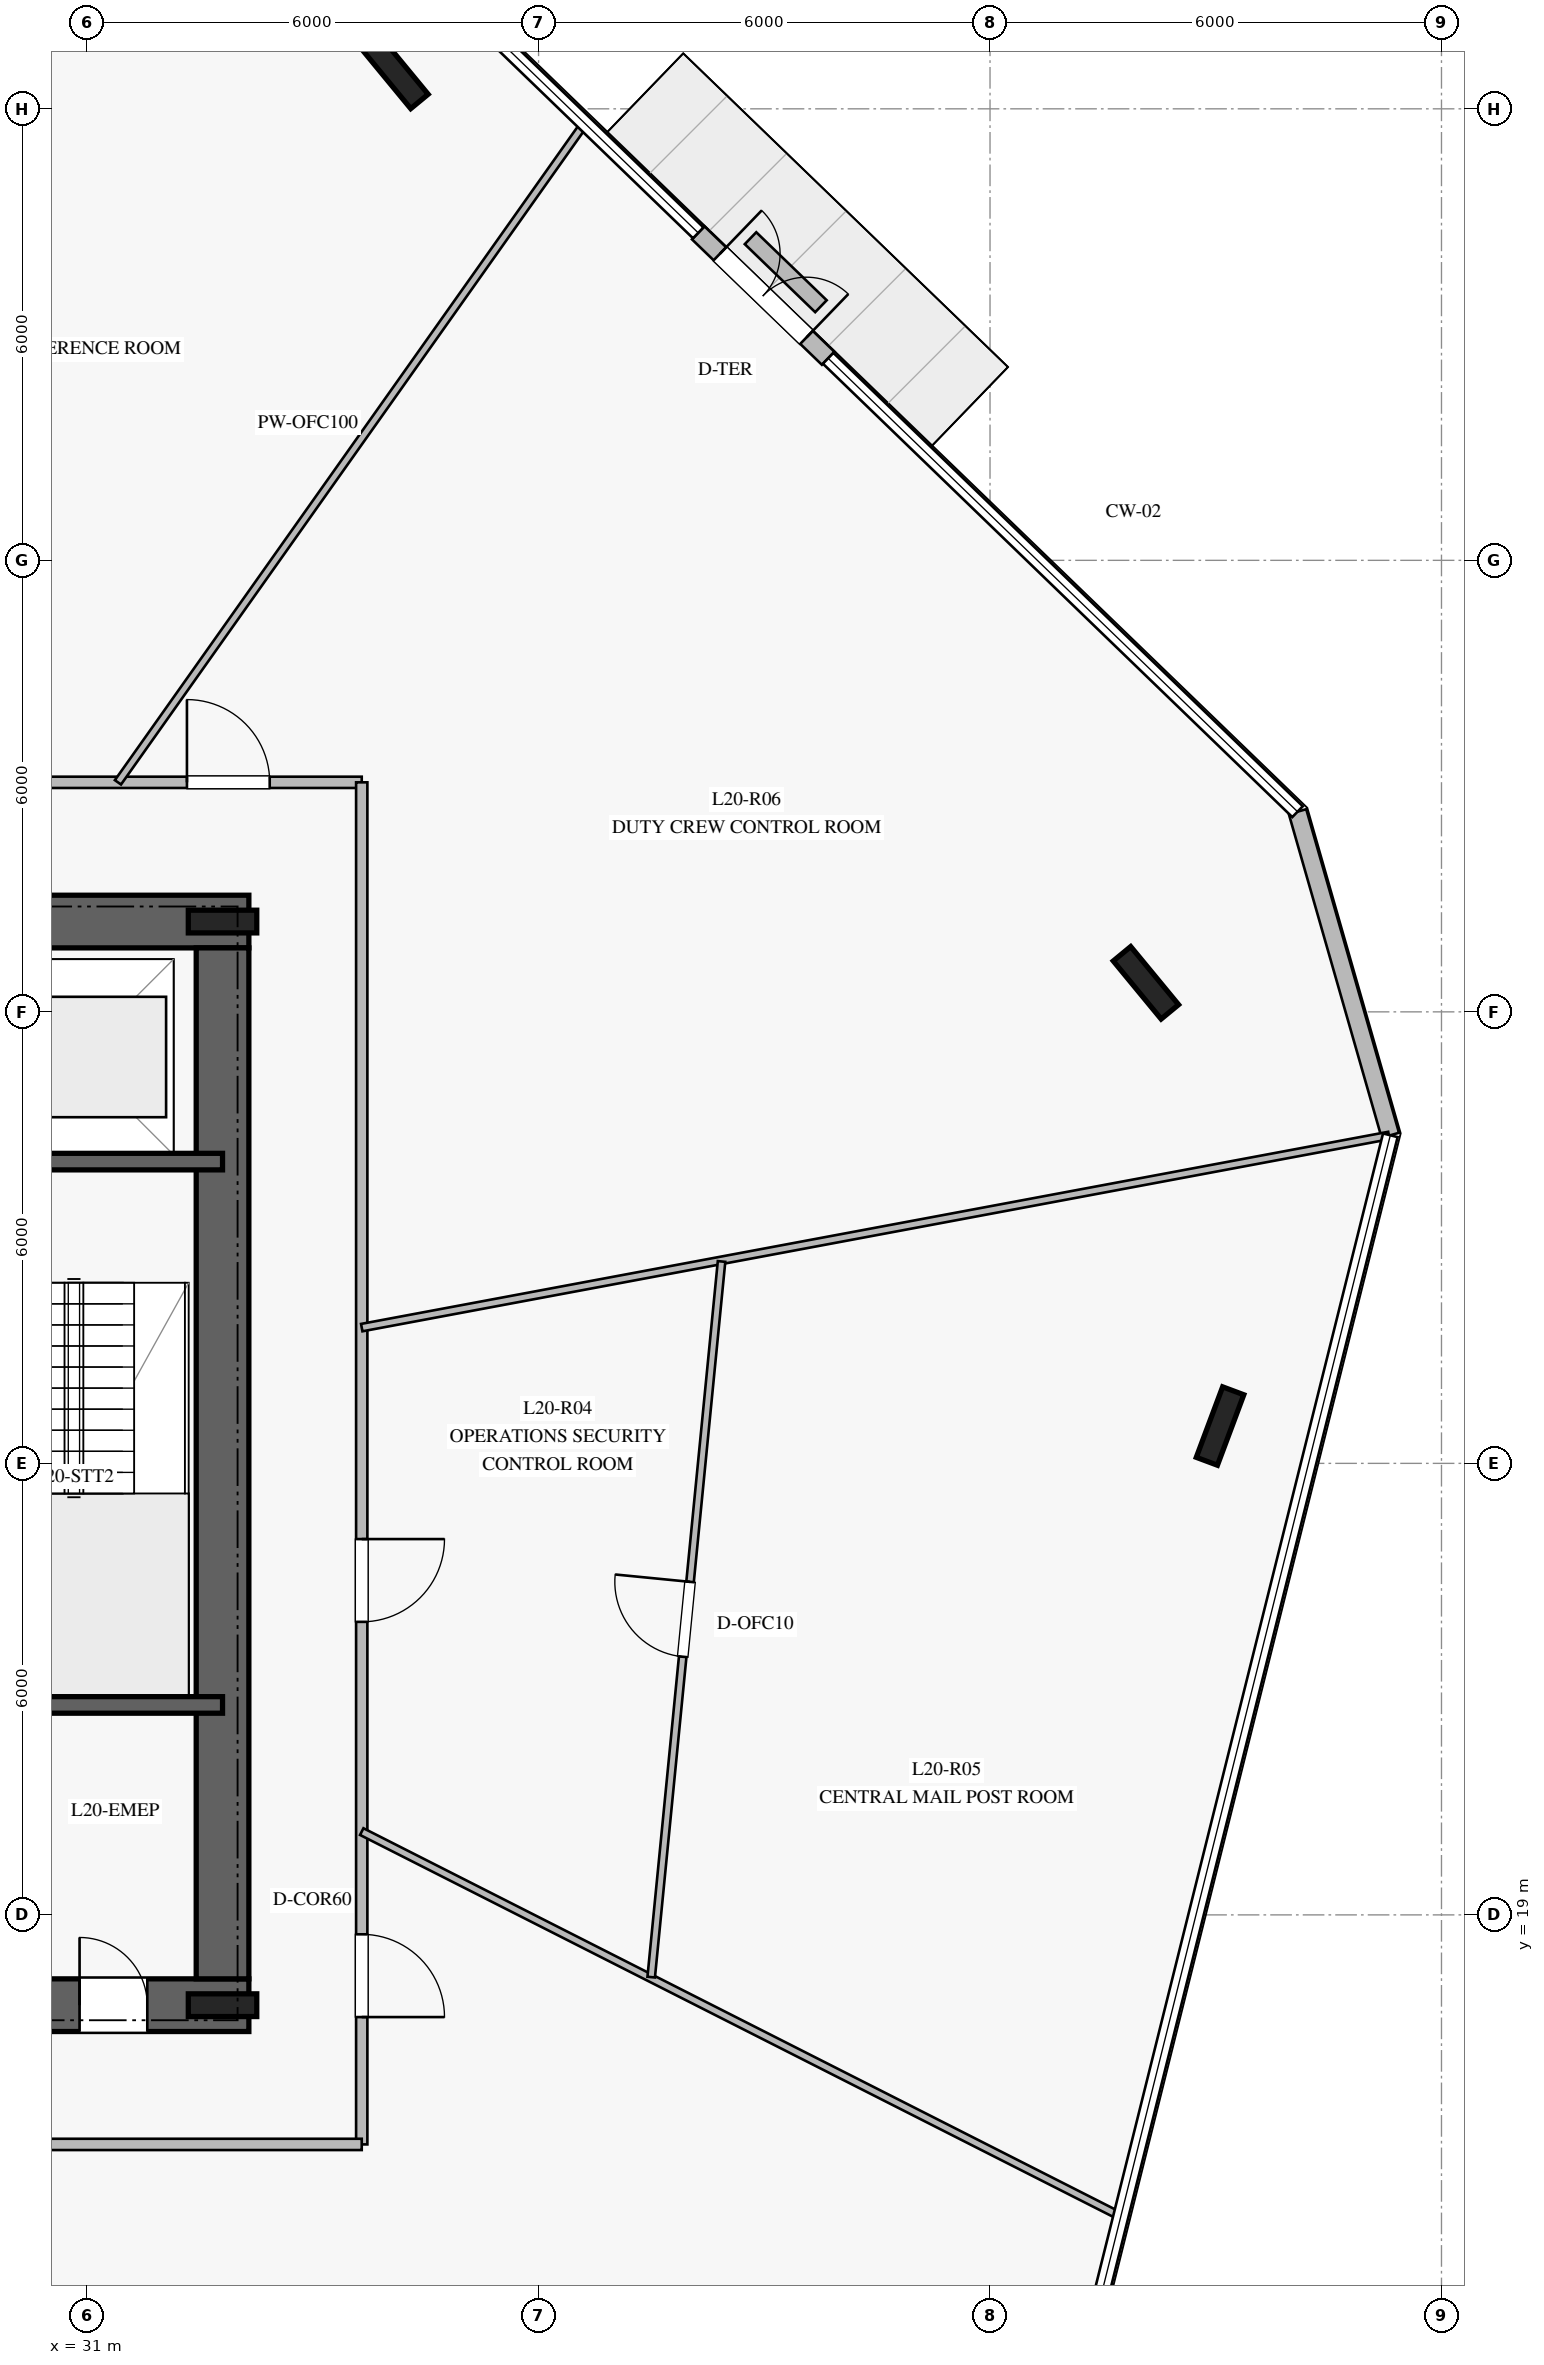
"""IFC4 building model, lengths in metres.
Left out: names, types, materials, properties, quantities, classifications, styles, units other than length and angle.
Written with IfcOpenShell. Run it as: python <this file> out.ifc"""

import sys

from ifc_helpers import new_model, si_unit, direction, frame, frame_2d, origin, origin_2d, place, context, subcontext, project, spatial, rectangle, i_section, extrude, element, fill, save


model = new_model("IFC4")
c1 = context("Model", 3, precision=1e-05, world=origin(), true_north=direction((0.0, 1.0)))
c2 = subcontext(c1, "Body", "Model", "MODEL_VIEW")
j1 = project(units=[si_unit("LENGTHUNIT", "METRE"), si_unit("PLANEANGLEUNIT", "RADIAN")], contexts=[c1])
p1 = place(None, origin())
s1 = spatial("IfcSite", under=j1, at=p1, CompositionType="ELEMENT")
p2 = place(p1, origin())
s2 = spatial("IfcBuilding", under=s1, at=p2, CompositionType="ELEMENT")
p3 = place(p2, frame((0.0, 0.0, 84.0)))
s3 = spatial("IfcBuildingStorey", under=s2, at=p3, CompositionType="ELEMENT", Elevation=84.0)
p4 = place(p3, frame((16.85, 17.8, 0.0), z_axis=(0.0, 0.0, 1.0), x_axis=(1.0, 0.0, 0.0)))
e1 = element("IfcWall", 1, at=p4, inside=s3, PredefinedType="SHEAR", context=c2, shape_type="SweptSolid", body=[
    extrude(rectangle(XDim=16.3, YDim=0.7, at=frame_2d((8.15, 0.0))), origin(), (0.0, 0.0, 1.0), 3.76),
])
p5 = place(p4, frame((5.1, 0.0, 0.0)))
e2 = element("IfcOpeningElement", 2, at=p5, cuts=e1, PredefinedType="OPENING", context=c2, shape_type="SweptSolid", body=[
    extrude(rectangle(XDim=1.2, YDim=2.25, at=frame_2d((0.6, 1.125))), frame((0.0, 0.36, 0.0), z_axis=(0.0, -1.0, 0.0), x_axis=(1.0, 0.0, 0.0)), (0.0, 0.0, 1.0), 0.72),
])
p6 = place(p4, frame((14.05, 0.0, 0.0)))
e3 = element("IfcOpeningElement", 3, at=p6, cuts=e1, PredefinedType="OPENING", context=c2, shape_type="SweptSolid", body=[
    extrude(rectangle(XDim=0.9, YDim=2.1, at=frame_2d((0.45, 1.05))), frame((0.0, 0.36, 0.0), z_axis=(0.0, -1.0, 0.0), x_axis=(1.0, 0.0, 0.0)), (0.0, 0.0, 1.0), 0.72),
])
p7 = place(p4, frame((7.95, 0.0, 0.0)))
e4 = element("IfcOpeningElement", 4, at=p7, cuts=e1, PredefinedType="OPENING", context=c2, shape_type="SweptSolid", body=[
    extrude(rectangle(XDim=1.1, YDim=2.2, at=frame_2d((0.55, 1.1))), frame((0.0, 0.36, 0.0), z_axis=(0.0, -1.0, 0.0), x_axis=(1.0, 0.0, 0.0)), (0.0, 0.0, 1.0), 0.72),
])
p8 = place(p4, frame((9.925, 0.0, 0.0)))
e5 = element("IfcOpeningElement", 5, at=p8, cuts=e1, PredefinedType="OPENING", context=c2, shape_type="SweptSolid", body=[
    extrude(rectangle(XDim=1.1, YDim=2.2, at=frame_2d((0.55, 1.1))), frame((0.0, 0.36, 0.0), z_axis=(0.0, -1.0, 0.0), x_axis=(1.0, 0.0, 0.0)), (0.0, 0.0, 1.0), 0.72),
])
p9 = place(p4, frame((11.9, 0.0, 0.0)))
e6 = element("IfcOpeningElement", 6, at=p9, cuts=e1, PredefinedType="OPENING", context=c2, shape_type="SweptSolid", body=[
    extrude(rectangle(XDim=1.1, YDim=2.2, at=frame_2d((0.55, 1.1))), frame((0.0, 0.36, 0.0), z_axis=(0.0, -1.0, 0.0), x_axis=(1.0, 0.0, 0.0)), (0.0, 0.0, 1.0), 0.72),
])
p10 = place(p3, frame((33.15, 32.2, 0.0), z_axis=(0.0, 0.0, 1.0), x_axis=(-1.0, 0.0, 0.0)))
e7 = element("IfcWall", 7, at=p10, inside=s3, PredefinedType="SHEAR", context=c2, shape_type="SweptSolid", body=[
    extrude(rectangle(XDim=16.3, YDim=0.7, at=frame_2d((8.15, 0.0))), origin(), (0.0, 0.0, 1.0), 3.76),
])
p11 = place(p10, frame((5.1, 0.0, 0.0)))
e8 = element("IfcOpeningElement", 8, at=p11, cuts=e7, PredefinedType="OPENING", context=c2, shape_type="SweptSolid", body=[
    extrude(rectangle(XDim=1.2, YDim=2.25, at=frame_2d((0.6, 1.125))), frame((0.0, 0.36, 0.0), z_axis=(0.0, -1.0, 0.0), x_axis=(1.0, 0.0, 0.0)), (0.0, 0.0, 1.0), 0.72),
])
p12 = place(p3, frame((32.8, 18.15, 0.0), z_axis=(0.0, 0.0, 1.0), x_axis=(0.0, 1.0, 0.0)))
e9 = element("IfcWall", 9, at=p12, inside=s3, PredefinedType="SHEAR", context=c2, shape_type="SweptSolid", body=[
    extrude(rectangle(XDim=13.7, YDim=0.7, at=frame_2d((6.85, 0.0))), origin(), (0.0, 0.0, 1.0), 3.76),
])
for number, where, z_axis, x_axis in (
    (10, (32.8, 17.8, 0.0), (0.0, 0.0, 1.0), (1.0, 0.0, 0.0)),
    (11, (32.8, 32.2, 0.0), (0.0, 0.0, 1.0), (1.0, 0.0, 0.0)),
):
    element("IfcColumn", number, at=place(p3, frame(where, z_axis=z_axis, x_axis=x_axis)), inside=s3, PredefinedType="COLUMN", context=c2, shape_type="SweptSolid", body=[
        extrude(i_section(OverallWidth=0.302, OverallDepth=0.91, WebThickness=0.021, FlangeThickness=0.04, at=origin_2d()), origin(), (0.0, 0.0, 1.0), 4.0),
    ])
for number, where, z_axis, x_axis in (
    (12, (29.08, 21.79, 0.0), (0.0, 0.0, 1.0), (1.0, 0.0, 0.0)),
    (13, (29.08, 29.01, 0.0), (0.0, 0.0, 1.0), (1.0, 0.0, 0.0)),
):
    element("IfcWall", number, at=place(p3, frame(where, z_axis=z_axis, x_axis=x_axis)), inside=s3, PredefinedType="SOLIDWALL", context=c2, shape_type="SweptSolid", body=[
        extrude(rectangle(XDim=3.72, YDim=0.22, at=frame_2d((1.86, 0.0))), origin(), (0.0, 0.0, 1.0), 3.76),
    ])
for number, where, z_axis, x_axis in (
    (14, (45.072, 31.386, 0.0), (0.0, 0.0, 1.0), (-0.636, 0.772, 0.0)),
    (15, (35.099, 43.484, 0.0), (0.0, 0.0, 1.0), (-0.636, 0.772, 0.0)),
    (16, (46.057, 25.496, 0.0), (0.0, 0.0, 1.0), (0.35, 0.937, 0.0)),
):
    element("IfcColumn", number, at=place(p3, frame(where, z_axis=z_axis, x_axis=x_axis)), inside=s3, PredefinedType="COLUMN", context=c2, shape_type="SweptSolid", body=[
        extrude(i_section(OverallWidth=0.3, OverallDepth=1.0, WebThickness=0.019, FlangeThickness=0.036, at=origin_2d()), origin(), (0.0, 0.0, 1.0), 4.0),
    ])
p13 = place(p3, frame((40.849, 39.685, 0.0), z_axis=(0.0, 0.0, 1.0), x_axis=(-0.719506606337, 0.694485596278, 0.0)))
e17 = element("IfcWall", 17, at=p13, inside=s3, PredefinedType="STANDARD", context=c2, shape_type="SweptSolid", body=[
    extrude(rectangle(XDim=2.4, YDim=0.24, at=frame_2d((1.2, 0.0))), origin(), (0.0, 0.0, 1.0), 3.76),
])
p14 = place(p13, frame((0.4, 0.0, 0.0)))
e18 = element("IfcOpeningElement", 18, at=p14, cuts=e17, PredefinedType="OPENING", context=c2, shape_type="SweptSolid", body=[
    extrude(rectangle(XDim=1.6, YDim=2.25, at=frame_2d((0.8, 1.125))), frame((0.0, 0.13, 0.0), z_axis=(0.0, -1.0, 0.0), x_axis=(1.0, 0.0, 0.0)), (0.0, 0.0, 1.0), 0.26),
])
p15 = place(p3, frame((48.32, 29.36, 0.0), z_axis=(0.0, 0.0, 1.0), x_axis=(-0.275679732289, 0.96124954367, 0.0)))
e19 = element("IfcWall", 19, at=p15, inside=s3, PredefinedType="STANDARD", context=c2, shape_type="SweptSolid", body=[
    extrude(rectangle(XDim=4.473, YDim=0.24, at=frame_2d((2.237, 0.0))), origin(), (0.0, 0.0, 1.0), 3.76),
])
p16 = place(p3, frame((40.753, 40.377, 0.0), z_axis=(0.0, 0.0, 1.0), x_axis=(-0.719288309138, 0.694711687204, 0.0)))
e20 = element("IfcWall", 20, at=p16, inside=s3, PredefinedType="USERDEFINED", context=c2, shape_type="SweptSolid", body=[
    extrude(rectangle(XDim=1.301, YDim=0.22, at=frame_2d((0.651, 0.0))), origin(), (0.0, 0.0, 1.0), 0.4),
])
p17 = place(p3, frame((15.35, 34.05, 0.0), z_axis=(0.0, 0.0, 1.0), x_axis=(1.0, 0.0, 0.0)))
e21 = element("IfcWall", 21, at=p17, inside=s3, PredefinedType="PARTITIONING", context=c2, shape_type="SweptSolid", body=[
    extrude(rectangle(XDim=19.3, YDim=0.15, at=frame_2d((9.65, 0.0))), origin(), (0.0, 0.0, 1.0), 3.21),
])
p18 = place(p17, frame((16.977, 0.0, 0.0)))
e22 = element("IfcOpeningElement", 22, at=p18, cuts=e21, PredefinedType="OPENING", context=c2, shape_type="SweptSolid", body=[
    extrude(rectangle(XDim=1.1, YDim=2.2, at=frame_2d((0.55, 1.1))), frame((0.0, 0.085, 0.0), z_axis=(0.0, -1.0, 0.0), x_axis=(1.0, 0.0, 0.0)), (0.0, 0.0, 1.0), 0.17),
])
p19 = place(p17, frame((11.996, 0.0, 0.0)))
e23 = element("IfcOpeningElement", 23, at=p19, cuts=e21, PredefinedType="OPENING", context=c2, shape_type="SweptSolid", body=[
    extrude(rectangle(XDim=1.1, YDim=2.2, at=frame_2d((0.55, 1.1))), frame((0.0, 0.085, 0.0), z_axis=(0.0, -1.0, 0.0), x_axis=(1.0, 0.0, 0.0)), (0.0, 0.0, 1.0), 0.17),
])
p20 = place(p17, frame((4.847, 0.0, 0.0)))
e24 = element("IfcOpeningElement", 24, at=p20, cuts=e21, PredefinedType="OPENING", context=c2, shape_type="SweptSolid", body=[
    extrude(rectangle(XDim=1.1, YDim=2.2, at=frame_2d((0.55, 1.1))), frame((0.0, 0.085, 0.0), z_axis=(0.0, -1.0, 0.0), x_axis=(1.0, 0.0, 0.0)), (0.0, 0.0, 1.0), 0.17),
])
p21 = place(p3, frame((34.65, 34.05, 0.0), z_axis=(0.0, 0.0, 1.0), x_axis=(0.0, -1.0, 0.0)))
e25 = element("IfcWall", 25, at=p21, inside=s3, PredefinedType="PARTITIONING", context=c2, shape_type="SweptSolid", body=[
    extrude(rectangle(XDim=18.1, YDim=0.15, at=frame_2d((9.05, 0.0))), origin(), (0.0, 0.0, 1.0), 3.21),
])
p22 = place(p21, frame((15.308, 0.0, 0.0)))
e26 = element("IfcOpeningElement", 26, at=p22, cuts=e25, PredefinedType="OPENING", context=c2, shape_type="SweptSolid", body=[
    extrude(rectangle(XDim=1.1, YDim=2.2, at=frame_2d((0.55, 1.1))), frame((0.0, 0.085, 0.0), z_axis=(0.0, -1.0, 0.0), x_axis=(1.0, 0.0, 0.0)), (0.0, 0.0, 1.0), 0.17),
])
p23 = place(p21, frame((10.056, 0.0, 0.0)))
e27 = element("IfcOpeningElement", 27, at=p23, cuts=e25, PredefinedType="OPENING", context=c2, shape_type="SweptSolid", body=[
    extrude(rectangle(XDim=1.1, YDim=2.2, at=frame_2d((0.55, 1.1))), frame((0.0, 0.085, 0.0), z_axis=(0.0, -1.0, 0.0), x_axis=(1.0, 0.0, 0.0)), (0.0, 0.0, 1.0), 0.17),
])
p24 = place(p3, frame((34.65, 15.95, 0.0), z_axis=(0.0, 0.0, 1.0), x_axis=(-1.0, 0.0, 0.0)))
e28 = element("IfcWall", 28, at=p24, inside=s3, PredefinedType="PARTITIONING", context=c2, shape_type="SweptSolid", body=[
    extrude(rectangle(XDim=19.3, YDim=0.15, at=frame_2d((9.65, 0.0))), origin(), (0.0, 0.0, 1.0), 3.21),
])
p25 = place(p24, frame((16.977, 0.0, 0.0)))
e29 = element("IfcOpeningElement", 29, at=p25, cuts=e28, PredefinedType="OPENING", context=c2, shape_type="SweptSolid", body=[
    extrude(rectangle(XDim=1.1, YDim=2.2, at=frame_2d((0.55, 1.1))), frame((0.0, 0.085, 0.0), z_axis=(0.0, -1.0, 0.0), x_axis=(1.0, 0.0, 0.0)), (0.0, 0.0, 1.0), 0.17),
])
p26 = place(p24, frame((11.66, 0.0, 0.0)))
e30 = element("IfcOpeningElement", 30, at=p26, cuts=e28, PredefinedType="OPENING", context=c2, shape_type="SweptSolid", body=[
    extrude(rectangle(XDim=1.1, YDim=2.2, at=frame_2d((0.55, 1.1))), frame((0.0, 0.085, 0.0), z_axis=(0.0, -1.0, 0.0), x_axis=(1.0, 0.0, 0.0)), (0.0, 0.0, 1.0), 0.17),
])
p27 = place(p3, frame((31.41, 34.05, 0.0), z_axis=(0.0, 0.0, 1.0), x_axis=(0.577987627676, 0.816045527071, 0.0)))
e31 = element("IfcWall", 31, at=p27, inside=s3, PredefinedType="MOVABLE", context=c2, shape_type="SweptSolid", body=[
    extrude(rectangle(XDim=10.715, YDim=0.1, at=frame_2d((5.357, 0.0))), origin(), (0.0, 0.0, 1.0), 3.06),
])
p28 = place(p3, frame((34.65, 20.107, 0.0), z_axis=(0.0, 0.0, 1.0), x_axis=(0.891900925877, -0.452230846382, 0.0)))
e32 = element("IfcWall", 32, at=p28, inside=s3, PredefinedType="MOVABLE", context=c2, shape_type="SweptSolid", body=[
    extrude(rectangle(XDim=11.293, YDim=0.1, at=frame_2d((5.646, 0.0))), origin(), (0.0, 0.0, 1.0), 3.06),
])
p29 = place(p3, frame((34.65, 26.804, 0.0), z_axis=(0.0, 0.0, 1.0), x_axis=(0.982958252247, 0.183828926831, 0.0)))
e33 = element("IfcWall", 33, at=p29, inside=s3, PredefinedType="MOVABLE", context=c2, shape_type="SweptSolid", body=[
    extrude(rectangle(XDim=13.888, YDim=0.1, at=frame_2d((6.944, 0.0))), origin(), (0.0, 0.0, 1.0), 3.06),
])
p30 = place(p3, frame((38.497, 18.173, 0.0), z_axis=(0.0, 0.0, 1.0), x_axis=(0.097826461563, 0.995203488447, 0.0)))
e34 = element("IfcWall", 34, at=p30, inside=s3, PredefinedType="MOVABLE", context=c2, shape_type="SweptSolid", body=[
    extrude(rectangle(XDim=9.556, YDim=0.1, at=frame_2d((4.778, 0.0))), origin(), (0.0, 0.0, 1.0), 3.76),
])
p31 = place(p30, frame((4.278, 0.0, 0.0)))
e35 = element("IfcOpeningElement", 35, at=p31, cuts=e34, PredefinedType="OPENING", context=c2, shape_type="SweptSolid", body=[
    extrude(rectangle(XDim=1.0, YDim=2.15, at=frame_2d((0.5, 1.075))), frame((0.0, 0.06, 0.0), z_axis=(0.0, -1.0, 0.0), x_axis=(1.0, 0.0, 0.0)), (0.0, 0.0, 1.0), 0.12),
])
p32 = place(p14, frame((1.6, 0.0, 0.0), z_axis=(0.0, 0.0, 1.0), x_axis=(-1.0, 0.0, 0.0)))
e36 = element("IfcDoor", 36, at=p32, inside=s3, OperationType="DOUBLE_DOOR_SINGLE_SWING", PredefinedType="DOOR", context=c2, shape_type="SweptSolid", body=[
    extrude(rectangle(XDim=1.6, YDim=2.25, at=frame_2d((0.8, 1.125))), frame((0.0, 0.025, 0.0), z_axis=(0.0, -1.0, 0.0), x_axis=(1.0, 0.0, 0.0)), (0.0, 0.0, 1.0), 0.05),
])
fill(e18, e36)
p33 = place(p6, origin())
e37 = element("IfcDoor", 37, at=p33, inside=s3, OperationType="SINGLE_SWING_LEFT", PredefinedType="DOOR", context=c2, shape_type="SweptSolid", body=[
    extrude(rectangle(XDim=0.9, YDim=2.1, at=frame_2d((0.45, 1.05))), frame((0.0, 0.025, 0.0), z_axis=(0.0, -1.0, 0.0), x_axis=(1.0, 0.0, 0.0)), (0.0, 0.0, 1.0), 0.05),
])
fill(e3, e37)
p34 = place(p22, origin())
e38 = element("IfcDoor", 38, at=p34, inside=s3, OperationType="SINGLE_SWING_RIGHT", PredefinedType="DOOR", context=c2, shape_type="SweptSolid", body=[
    extrude(rectangle(XDim=1.1, YDim=2.2, at=frame_2d((0.55, 1.1))), frame((0.0, 0.025, 0.0), z_axis=(0.0, -1.0, 0.0), x_axis=(1.0, 0.0, 0.0)), (0.0, 0.0, 1.0), 0.05),
])
fill(e26, e38)
p35 = place(p23, origin())
e39 = element("IfcDoor", 39, at=p35, inside=s3, OperationType="SINGLE_SWING_LEFT", PredefinedType="DOOR", context=c2, shape_type="SweptSolid", body=[
    extrude(rectangle(XDim=1.1, YDim=2.2, at=frame_2d((0.55, 1.1))), frame((0.0, 0.025, 0.0), z_axis=(0.0, -1.0, 0.0), x_axis=(1.0, 0.0, 0.0)), (0.0, 0.0, 1.0), 0.05),
])
fill(e27, e39)
p36 = place(p31, origin())
e40 = element("IfcDoor", 40, at=p36, inside=s3, OperationType="SINGLE_SWING_RIGHT", PredefinedType="DOOR", context=c2, shape_type="SweptSolid", body=[
    extrude(rectangle(XDim=1.0, YDim=2.15, at=frame_2d((0.5, 1.075))), frame((0.0, 0.025, 0.0), z_axis=(0.0, -1.0, 0.0), x_axis=(1.0, 0.0, 0.0)), (0.0, 0.0, 1.0), 0.05),
])
fill(e35, e40)
p37 = place(p18, origin())
e41 = element("IfcDoor", 41, at=p37, inside=s3, OperationType="SINGLE_SWING_LEFT", PredefinedType="DOOR", context=c2, shape_type="SweptSolid", body=[
    extrude(rectangle(XDim=1.1, YDim=2.2, at=frame_2d((0.55, 1.1))), frame((0.0, 0.025, 0.0), z_axis=(0.0, -1.0, 0.0), x_axis=(1.0, 0.0, 0.0)), (0.0, 0.0, 1.0), 0.05),
])
fill(e22, e41)
save(model, sys.argv[1])
